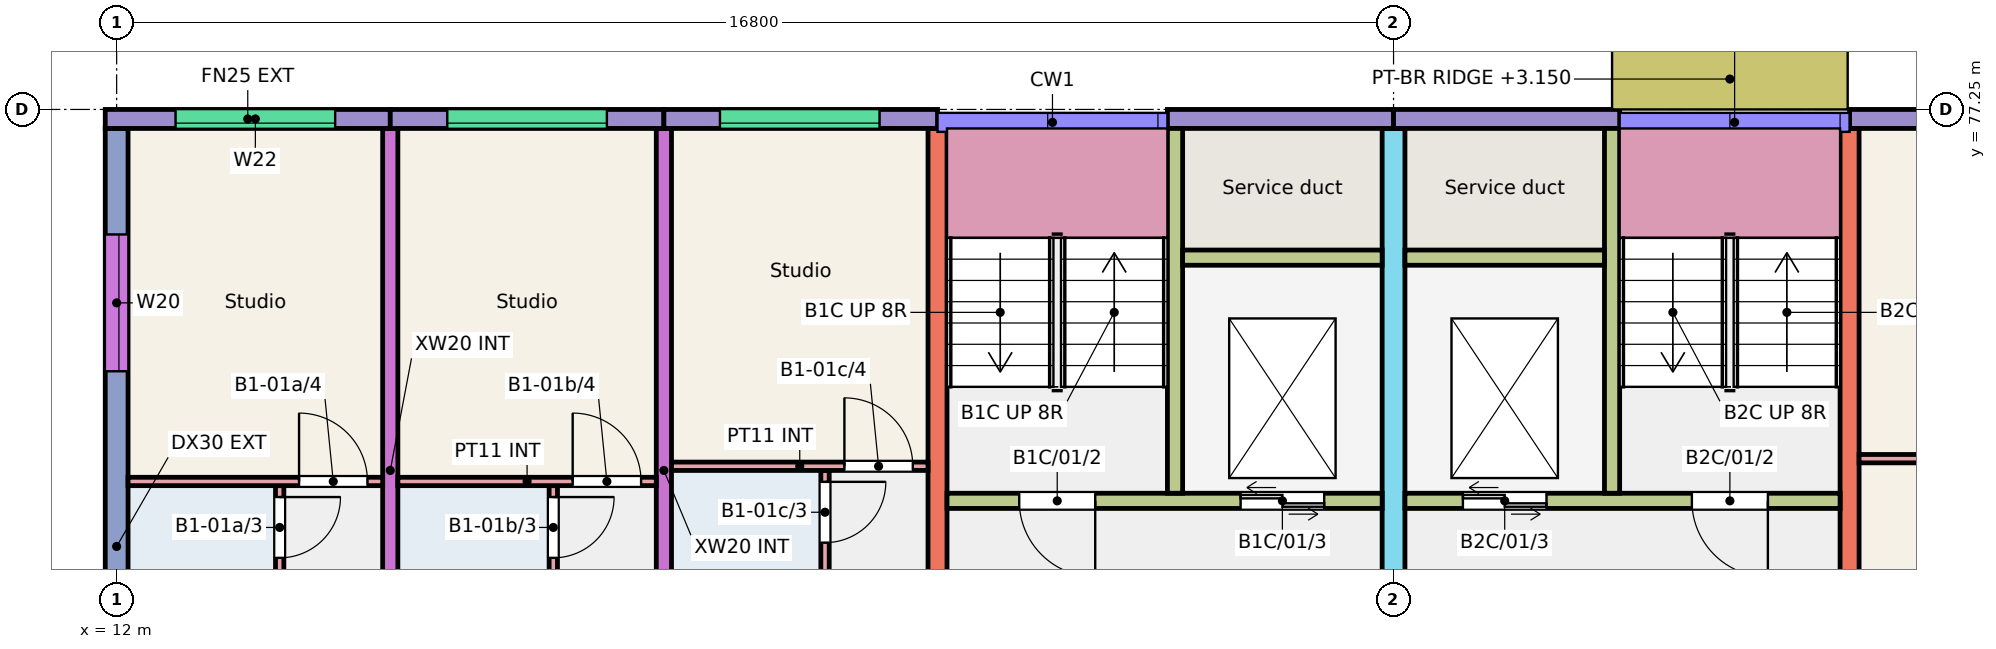
"""IFC4 building model, lengths in metres.
Left out: names, types, materials, properties, quantities, classifications, styles, units other than length and angle.
Written with IfcOpenShell. Run it as: python <this file> out.ifc"""

import sys

from ifc_helpers import new_model, si_unit, direction, frame, frame_2d, origin, place, context, subcontext, project, spatial, rectangle, extrude, element, fill, save


model = new_model("IFC4")
c1 = context("Model", 3, precision=1e-05, world=origin(), true_north=direction((0.0, 1.0)))
c2 = subcontext(c1, "Body", "Model", "MODEL_VIEW")
j1 = project(units=[si_unit("LENGTHUNIT", "METRE"), si_unit("PLANEANGLEUNIT", "RADIAN")], contexts=[c1])
p1 = place(None, origin())
s1 = spatial("IfcSite", under=j1, at=p1, CompositionType="ELEMENT")
p2 = place(p1, origin())
s2 = spatial("IfcBuilding", under=s1, at=p2, CompositionType="ELEMENT")
p3 = place(p2, frame((0.0, 0.0, 3.0)))
s3 = spatial("IfcBuildingStorey", under=s2, at=p3, CompositionType="ELEMENT", Elevation=3.0)
p4 = place(p3, frame((12.0, 66.0, 0.0), z_axis=(0.0, 0.0, 1.0), x_axis=(0.0, 1.0, 0.0)))
e1 = element("IfcWall", 1, at=p4, inside=s3, PredefinedType="SHEAR", context=c2, shape_type="SweptSolid", body=[
    extrude(rectangle(XDim=11.0, YDim=0.3, at=frame_2d((5.5, 0.0))), origin(), (0.0, 0.0, 1.0), 3.0),
])
p5 = place(p4, frame((2.6, 0.0, 0.9)))
e2 = element("IfcOpeningElement", 2, at=p5, cuts=e1, PredefinedType="OPENING", context=c2, shape_type="SweptSolid", body=[
    extrude(rectangle(XDim=1.2, YDim=1.5, at=frame_2d((0.6, 0.75))), frame((0.0, 0.16, 0.0), z_axis=(0.0, -1.0, 0.0), x_axis=(1.0, 0.0, 0.0)), (0.0, 0.0, 1.0), 0.32),
])
p6 = place(p4, frame((7.805, 0.0, 0.9)))
e3 = element("IfcOpeningElement", 3, at=p6, cuts=e1, PredefinedType="OPENING", context=c2, shape_type="SweptSolid", body=[
    extrude(rectangle(XDim=1.8, YDim=1.5, at=frame_2d((0.9, 0.75))), frame((0.0, 0.16, 0.0), z_axis=(0.0, -1.0, 0.0), x_axis=(1.0, 0.0, 0.0)), (0.0, 0.0, 1.0), 0.32),
])
for number, where, z_axis, x_axis in (
    (4, (15.6, 68.0, 0.0), (0.0, 0.0, 1.0), (0.0, 1.0, 0.0)),
    (5, (19.2, 68.0, 0.0), (0.0, 0.0, 1.0), (0.0, 1.0, 0.0)),
):
    element("IfcWall", number, at=place(p3, frame(where, z_axis=z_axis, x_axis=x_axis)), inside=s3, PredefinedType="SHEAR", context=c2, shape_type="SweptSolid", body=[
        extrude(rectangle(XDim=9.0, YDim=0.2, at=frame_2d((4.5, 0.0))), origin(), (0.0, 0.0, 1.0), 3.0),
    ])
p7 = place(p3, frame((22.8, 68.0, 0.0), z_axis=(0.0, 0.0, 1.0), x_axis=(0.0, 1.0, 0.0)))
e6 = element("IfcWall", 6, at=p7, inside=s3, PredefinedType="SHEAR", context=c2, shape_type="SweptSolid", body=[
    extrude(rectangle(XDim=9.0, YDim=0.25, at=frame_2d((4.5, 0.0))), origin(), (0.0, 0.0, 1.0), 3.0),
])
p8 = place(p3, frame((28.8, 66.0, 0.0), z_axis=(0.0, 0.0, 1.0), x_axis=(0.0, 1.0, 0.0)))
e7 = element("IfcWall", 7, at=p8, inside=s3, PredefinedType="SHEAR", context=c2, shape_type="SweptSolid", body=[
    extrude(rectangle(XDim=11.0, YDim=0.3, at=frame_2d((5.5, 0.0))), origin(), (0.0, 0.0, 1.0), 3.0),
])
p9 = place(p8, frame((0.3, 0.0, 0.0)))
e8 = element("IfcOpeningElement", 8, at=p9, cuts=e7, PredefinedType="OPENING", context=c2, shape_type="SweptSolid", body=[
    extrude(rectangle(XDim=1.2, YDim=2.1, at=frame_2d((0.6, 1.05))), frame((0.0, 0.16, 0.0), z_axis=(0.0, -1.0, 0.0), x_axis=(1.0, 0.0, 0.0)), (0.0, 0.0, 1.0), 0.32),
])
p10 = place(p3, frame((34.8, 68.0, 0.0), z_axis=(0.0, 0.0, 1.0), x_axis=(0.0, 1.0, 0.0)))
e9 = element("IfcWall", 9, at=p10, inside=s3, PredefinedType="SHEAR", context=c2, shape_type="SweptSolid", body=[
    extrude(rectangle(XDim=9.0, YDim=0.25, at=frame_2d((4.5, 0.0))), origin(), (0.0, 0.0, 1.0), 3.0),
])
p11 = place(p3, frame((11.85, 77.125, 0.0), z_axis=(0.0, 0.0, 1.0), x_axis=(1.0, 0.0, 0.0)))
e10 = element("IfcWall", 10, at=p11, inside=s3, PredefinedType="SOLIDWALL", context=c2, shape_type="SweptSolid", body=[
    extrude(rectangle(XDim=3.75, YDim=0.25, at=frame_2d((1.875, 0.0))), origin(), (0.0, 0.0, 1.0), 3.0),
])
p12 = place(p11, frame((0.925, 0.0, 1.2)))
e11 = element("IfcOpeningElement", 11, at=p12, cuts=e10, PredefinedType="OPENING", context=c2, shape_type="SweptSolid", body=[
    extrude(rectangle(XDim=2.1, YDim=1.2, at=frame_2d((1.05, 0.6))), frame((0.0, 0.135, 0.0), z_axis=(0.0, -1.0, 0.0), x_axis=(1.0, 0.0, 0.0)), (0.0, 0.0, 1.0), 0.27),
])
p13 = place(p3, frame((15.6, 77.125, 0.0), z_axis=(0.0, 0.0, 1.0), x_axis=(1.0, 0.0, 0.0)))
e12 = element("IfcWall", 12, at=p13, inside=s3, PredefinedType="SOLIDWALL", context=c2, shape_type="SweptSolid", body=[
    extrude(rectangle(XDim=3.6, YDim=0.25, at=frame_2d((1.8, 0.0))), origin(), (0.0, 0.0, 1.0), 3.0),
])
p14 = place(p13, frame((0.75, 0.0, 1.2)))
e13 = element("IfcOpeningElement", 13, at=p14, cuts=e12, PredefinedType="OPENING", context=c2, shape_type="SweptSolid", body=[
    extrude(rectangle(XDim=2.1, YDim=1.2, at=frame_2d((1.05, 0.6))), frame((0.0, 0.135, 0.0), z_axis=(0.0, -1.0, 0.0), x_axis=(1.0, 0.0, 0.0)), (0.0, 0.0, 1.0), 0.27),
])
p15 = place(p3, frame((19.2, 77.125, 0.0), z_axis=(0.0, 0.0, 1.0), x_axis=(1.0, 0.0, 0.0)))
e14 = element("IfcWall", 14, at=p15, inside=s3, PredefinedType="SOLIDWALL", context=c2, shape_type="SweptSolid", body=[
    extrude(rectangle(XDim=3.6, YDim=0.25, at=frame_2d((1.8, 0.0))), origin(), (0.0, 0.0, 1.0), 3.0),
])
p16 = place(p15, frame((0.738, 0.0, 1.2)))
e15 = element("IfcOpeningElement", 15, at=p16, cuts=e14, PredefinedType="OPENING", context=c2, shape_type="SweptSolid", body=[
    extrude(rectangle(XDim=2.1, YDim=1.2, at=frame_2d((1.05, 0.6))), frame((0.0, 0.135, 0.0), z_axis=(0.0, -1.0, 0.0), x_axis=(1.0, 0.0, 0.0)), (0.0, 0.0, 1.0), 0.27),
])
p17 = place(p3, frame((25.825, 77.125, 0.0), z_axis=(0.0, 0.0, 1.0), x_axis=(1.0, 0.0, 0.0)))
e16 = element("IfcWall", 16, at=p17, inside=s3, PredefinedType="SOLIDWALL", context=c2, shape_type="SweptSolid", body=[
    extrude(rectangle(XDim=2.975, YDim=0.25, at=frame_2d((1.488, 0.0))), origin(), (0.0, 0.0, 1.0), 3.0),
])
p18 = place(p3, frame((22.925, 72.1, 0.0), z_axis=(0.0, 0.0, 1.0), x_axis=(1.0, 0.0, 0.0)))
e17 = element("IfcWall", 17, at=p18, inside=s3, PredefinedType="SHEAR", context=c2, shape_type="SweptSolid", body=[
    extrude(rectangle(XDim=5.725, YDim=0.2, at=frame_2d((2.862, 0.0))), origin(), (0.0, 0.0, 1.0), 3.0),
])
p19 = place(p18, frame((0.95, 0.0, 0.0)))
e18 = element("IfcOpeningElement", 18, at=p19, cuts=e17, PredefinedType="OPENING", context=c2, shape_type="SweptSolid", body=[
    extrude(rectangle(XDim=1.0, YDim=2.1, at=frame_2d((0.5, 1.05))), frame((0.0, 0.11, 0.0), z_axis=(0.0, -1.0, 0.0), x_axis=(1.0, 0.0, 0.0)), (0.0, 0.0, 1.0), 0.22),
])
p20 = place(p18, frame((3.863, 0.0, 0.0)))
e19 = element("IfcOpeningElement", 19, at=p20, cuts=e17, PredefinedType="OPENING", context=c2, shape_type="SweptSolid", body=[
    extrude(rectangle(XDim=1.1, YDim=2.1, at=frame_2d((0.55, 1.05))), frame((0.0, 0.11, 0.0), z_axis=(0.0, -1.0, 0.0), x_axis=(1.0, 0.0, 0.0)), (0.0, 0.0, 1.0), 0.22),
])
p21 = place(p3, frame((25.925, 72.2, 0.0), z_axis=(0.0, 0.0, 1.0), x_axis=(0.0, 1.0, 0.0)))
e20 = element("IfcWall", 20, at=p21, inside=s3, PredefinedType="SHEAR", context=c2, shape_type="SweptSolid", body=[
    extrude(rectangle(XDim=4.8, YDim=0.2, at=frame_2d((2.4, 0.0))), origin(), (0.0, 0.0, 1.0), 3.0),
])
p22 = place(p3, frame((26.025, 75.3, 0.0), z_axis=(0.0, 0.0, 1.0), x_axis=(1.0, 0.0, 0.0)))
e21 = element("IfcWall", 21, at=p22, inside=s3, PredefinedType="SHEAR", context=c2, shape_type="SweptSolid", body=[
    extrude(rectangle(XDim=2.625, YDim=0.2, at=frame_2d((1.312, 0.0))), origin(), (0.0, 0.0, 1.0), 3.0),
])
p23 = place(p3, frame((28.8, 77.125, 0.0), z_axis=(0.0, 0.0, 1.0), x_axis=(1.0, 0.0, 0.0)))
e22 = element("IfcWall", 22, at=p23, inside=s3, PredefinedType="SOLIDWALL", context=c2, shape_type="SweptSolid", body=[
    extrude(rectangle(XDim=2.975, YDim=0.25, at=frame_2d((1.487, 0.0))), origin(), (0.0, 0.0, 1.0), 3.0),
])
p24 = place(p3, frame((28.95, 72.1, 0.0), z_axis=(0.0, 0.0, 1.0), x_axis=(1.0, 0.0, 0.0)))
e23 = element("IfcWall", 23, at=p24, inside=s3, PredefinedType="SHEAR", context=c2, shape_type="SweptSolid", body=[
    extrude(rectangle(XDim=5.725, YDim=0.2, at=frame_2d((2.863, 0.0))), origin(), (0.0, 0.0, 1.0), 3.0),
])
p25 = place(p24, frame((3.775, 0.0, 0.0)))
e24 = element("IfcOpeningElement", 24, at=p25, cuts=e23, PredefinedType="OPENING", context=c2, shape_type="SweptSolid", body=[
    extrude(rectangle(XDim=1.0, YDim=2.1, at=frame_2d((0.5, 1.05))), frame((0.0, 0.11, 0.0), z_axis=(0.0, -1.0, 0.0), x_axis=(1.0, 0.0, 0.0)), (0.0, 0.0, 1.0), 0.22),
])
p26 = place(p24, frame((0.762, 0.0, 0.0)))
e25 = element("IfcOpeningElement", 25, at=p26, cuts=e23, PredefinedType="OPENING", context=c2, shape_type="SweptSolid", body=[
    extrude(rectangle(XDim=1.1, YDim=2.1, at=frame_2d((0.55, 1.05))), frame((0.0, 0.11, 0.0), z_axis=(0.0, -1.0, 0.0), x_axis=(1.0, 0.0, 0.0)), (0.0, 0.0, 1.0), 0.22),
])
p27 = place(p3, frame((31.675, 72.2, 0.0), z_axis=(0.0, 0.0, 1.0), x_axis=(0.0, 1.0, 0.0)))
e26 = element("IfcWall", 26, at=p27, inside=s3, PredefinedType="SHEAR", context=c2, shape_type="SweptSolid", body=[
    extrude(rectangle(XDim=4.8, YDim=0.2, at=frame_2d((2.4, 0.0))), origin(), (0.0, 0.0, 1.0), 3.0),
])
p28 = place(p3, frame((28.95, 75.3, 0.0), z_axis=(0.0, 0.0, 1.0), x_axis=(1.0, 0.0, 0.0)))
e27 = element("IfcWall", 27, at=p28, inside=s3, PredefinedType="SHEAR", context=c2, shape_type="SweptSolid", body=[
    extrude(rectangle(XDim=2.625, YDim=0.2, at=frame_2d((1.312, 0.0))), origin(), (0.0, 0.0, 1.0), 3.0),
])
p29 = place(p3, frame((34.8, 77.125, 0.0), z_axis=(0.0, 0.0, 1.0), x_axis=(1.0, 0.0, 0.0)))
e28 = element("IfcWall", 28, at=p29, inside=s3, PredefinedType="SOLIDWALL", context=c2, shape_type="SweptSolid", body=[
    extrude(rectangle(XDim=3.6, YDim=0.25, at=frame_2d((1.8, 0.0))), origin(), (0.0, 0.0, 1.0), 3.0),
])
p30 = place(p29, frame((1.2, 0.0, 1.1)))
e29 = element("IfcOpeningElement", 29, at=p30, cuts=e28, PredefinedType="OPENING", context=c2, shape_type="SweptSolid", body=[
    extrude(rectangle(XDim=1.2, YDim=1.3, at=frame_2d((0.6, 0.65))), frame((0.0, 0.135, 0.0), z_axis=(0.0, -1.0, 0.0), x_axis=(1.0, 0.0, 0.0)), (0.0, 0.0, 1.0), 0.27),
])
p31 = place(p3, frame((14.145, 68.0, 0.0), z_axis=(0.0, 0.0, 1.0), x_axis=(0.0, 1.0, 0.0)))
e30 = element("IfcWall", 30, at=p31, inside=s3, PredefinedType="PARTITIONING", context=c2, shape_type="SweptSolid", body=[
    extrude(rectangle(XDim=4.3, YDim=0.11, at=frame_2d((2.15, 0.0))), origin(), (0.0, 0.0, 1.0), 2.8),
])
p32 = place(p31, frame((0.2, 0.0, 0.0)))
e31 = element("IfcOpeningElement", 31, at=p32, cuts=e30, PredefinedType="OPENING", context=c2, shape_type="SweptSolid", body=[
    extrude(rectangle(XDim=0.8, YDim=2.1, at=frame_2d((0.4, 1.05))), frame((0.0, 0.065, 0.0), z_axis=(0.0, -1.0, 0.0), x_axis=(1.0, 0.0, 0.0)), (0.0, 0.0, 1.0), 0.13),
])
p33 = place(p31, frame((3.35, 0.0, 0.0)))
e32 = element("IfcOpeningElement", 32, at=p33, cuts=e30, PredefinedType="OPENING", context=c2, shape_type="SweptSolid", body=[
    extrude(rectangle(XDim=0.8, YDim=2.1, at=frame_2d((0.4, 1.05))), frame((0.0, 0.065, 0.0), z_axis=(0.0, -1.0, 0.0), x_axis=(1.0, 0.0, 0.0)), (0.0, 0.0, 1.0), 0.13),
])
p34 = place(p3, frame((12.15, 72.355, 0.0), z_axis=(0.0, 0.0, 1.0), x_axis=(1.0, 0.0, 0.0)))
e33 = element("IfcWall", 33, at=p34, inside=s3, PredefinedType="PARTITIONING", context=c2, shape_type="SweptSolid", body=[
    extrude(rectangle(XDim=3.35, YDim=0.11, at=frame_2d((1.675, 0.0))), origin(), (0.0, 0.0, 1.0), 2.8),
])
p35 = place(p34, frame((2.25, 0.0, 0.0)))
e34 = element("IfcOpeningElement", 34, at=p35, cuts=e33, PredefinedType="OPENING", context=c2, shape_type="SweptSolid", body=[
    extrude(rectangle(XDim=0.9, YDim=2.1, at=frame_2d((0.45, 1.05))), frame((0.0, 0.065, 0.0), z_axis=(0.0, -1.0, 0.0), x_axis=(1.0, 0.0, 0.0)), (0.0, 0.0, 1.0), 0.13),
])
p36 = place(p3, frame((17.745, 68.0, 0.0), z_axis=(0.0, 0.0, 1.0), x_axis=(0.0, 1.0, 0.0)))
e35 = element("IfcWall", 35, at=p36, inside=s3, PredefinedType="PARTITIONING", context=c2, shape_type="SweptSolid", body=[
    extrude(rectangle(XDim=4.3, YDim=0.11, at=frame_2d((2.15, 0.0))), origin(), (0.0, 0.0, 1.0), 2.8),
])
p37 = place(p36, frame((0.2, 0.0, 0.0)))
e36 = element("IfcOpeningElement", 36, at=p37, cuts=e35, PredefinedType="OPENING", context=c2, shape_type="SweptSolid", body=[
    extrude(rectangle(XDim=0.8, YDim=2.1, at=frame_2d((0.4, 1.05))), frame((0.0, 0.065, 0.0), z_axis=(0.0, -1.0, 0.0), x_axis=(1.0, 0.0, 0.0)), (0.0, 0.0, 1.0), 0.13),
])
p38 = place(p36, frame((3.35, 0.0, 0.0)))
e37 = element("IfcOpeningElement", 37, at=p38, cuts=e35, PredefinedType="OPENING", context=c2, shape_type="SweptSolid", body=[
    extrude(rectangle(XDim=0.8, YDim=2.1, at=frame_2d((0.4, 1.05))), frame((0.0, 0.065, 0.0), z_axis=(0.0, -1.0, 0.0), x_axis=(1.0, 0.0, 0.0)), (0.0, 0.0, 1.0), 0.13),
])
p39 = place(p3, frame((15.7, 72.355, 0.0), z_axis=(0.0, 0.0, 1.0), x_axis=(1.0, 0.0, 0.0)))
e38 = element("IfcWall", 38, at=p39, inside=s3, PredefinedType="PARTITIONING", context=c2, shape_type="SweptSolid", body=[
    extrude(rectangle(XDim=3.4, YDim=0.11, at=frame_2d((1.7, 0.0))), origin(), (0.0, 0.0, 1.0), 2.8),
])
p40 = place(p39, frame((2.3, 0.0, 0.0)))
e39 = element("IfcOpeningElement", 39, at=p40, cuts=e38, PredefinedType="OPENING", context=c2, shape_type="SweptSolid", body=[
    extrude(rectangle(XDim=0.9, YDim=2.1, at=frame_2d((0.45, 1.05))), frame((0.0, 0.065, 0.0), z_axis=(0.0, -1.0, 0.0), x_axis=(1.0, 0.0, 0.0)), (0.0, 0.0, 1.0), 0.13),
])
p41 = place(p3, frame((21.32, 68.0, 0.0), z_axis=(0.0, 0.0, 1.0), x_axis=(0.0, 1.0, 0.0)))
e40 = element("IfcWall", 40, at=p41, inside=s3, PredefinedType="PARTITIONING", context=c2, shape_type="SweptSolid", body=[
    extrude(rectangle(XDim=4.5, YDim=0.11, at=frame_2d((2.25, 0.0))), origin(), (0.0, 0.0, 1.0), 2.8),
])
p42 = place(p41, frame((0.2, 0.0, 0.0)))
e41 = element("IfcOpeningElement", 41, at=p42, cuts=e40, PredefinedType="OPENING", context=c2, shape_type="SweptSolid", body=[
    extrude(rectangle(XDim=0.8, YDim=2.1, at=frame_2d((0.4, 1.05))), frame((0.0, 0.065, 0.0), z_axis=(0.0, -1.0, 0.0), x_axis=(1.0, 0.0, 0.0)), (0.0, 0.0, 1.0), 0.13),
])
p43 = place(p41, frame((3.55, 0.0, 0.0)))
e42 = element("IfcOpeningElement", 42, at=p43, cuts=e40, PredefinedType="OPENING", context=c2, shape_type="SweptSolid", body=[
    extrude(rectangle(XDim=0.8, YDim=2.1, at=frame_2d((0.4, 1.05))), frame((0.0, 0.065, 0.0), z_axis=(0.0, -1.0, 0.0), x_axis=(1.0, 0.0, 0.0)), (0.0, 0.0, 1.0), 0.13),
])
p44 = place(p3, frame((19.3, 72.555, 0.0), z_axis=(0.0, 0.0, 1.0), x_axis=(1.0, 0.0, 0.0)))
e43 = element("IfcWall", 43, at=p44, inside=s3, PredefinedType="PARTITIONING", context=c2, shape_type="SweptSolid", body=[
    extrude(rectangle(XDim=3.375, YDim=0.11, at=frame_2d((1.688, 0.0))), origin(), (0.0, 0.0, 1.0), 2.8),
])
p45 = place(p44, frame((2.275, 0.0, 0.0)))
e44 = element("IfcOpeningElement", 44, at=p45, cuts=e43, PredefinedType="OPENING", context=c2, shape_type="SweptSolid", body=[
    extrude(rectangle(XDim=0.9, YDim=2.1, at=frame_2d((0.45, 1.05))), frame((0.0, 0.065, 0.0), z_axis=(0.0, -1.0, 0.0), x_axis=(1.0, 0.0, 0.0)), (0.0, 0.0, 1.0), 0.13),
])
p46 = place(p3, frame((34.925, 72.655, 0.0), z_axis=(0.0, 0.0, 1.0), x_axis=(1.0, 0.0, 0.0)))
e45 = element("IfcWall", 45, at=p46, inside=s3, PredefinedType="PARTITIONING", context=c2, shape_type="SweptSolid", body=[
    extrude(rectangle(XDim=3.35, YDim=0.11, at=frame_2d((1.675, 0.0))), origin(), (0.0, 0.0, 1.0), 2.8),
])
p47 = place(p12, origin())
e46 = element("IfcWindow", 46, at=p47, inside=s3, PartitioningType="SINGLE_PANEL", PredefinedType="WINDOW", context=c2, shape_type="SweptSolid", body=[
    extrude(rectangle(XDim=2.1, YDim=1.2, at=frame_2d((1.05, 0.6))), frame((0.0, -0.025, 0.0), z_axis=(0.0, -1.0, 0.0), x_axis=(1.0, 0.0, 0.0)), (0.0, 0.0, 1.0), 0.06),
])
fill(e11, e46)
p48 = place(p6, origin())
e47 = element("IfcWindow", 47, at=p48, inside=s3, PartitioningType="SINGLE_PANEL", PredefinedType="WINDOW", context=c2, shape_type="SweptSolid", body=[
    extrude(rectangle(XDim=1.8, YDim=1.5, at=frame_2d((0.9, 0.75))), frame((0.0, 0.0, 0.0), z_axis=(0.0, -1.0, 0.0), x_axis=(1.0, 0.0, 0.0)), (0.0, 0.0, 1.0), 0.06),
])
fill(e3, e47)
p49 = place(p14, origin())
e48 = element("IfcWindow", 48, at=p49, inside=s3, PartitioningType="SINGLE_PANEL", PredefinedType="WINDOW", context=c2, shape_type="SweptSolid", body=[
    extrude(rectangle(XDim=2.1, YDim=1.2, at=frame_2d((1.05, 0.6))), frame((0.0, -0.025, 0.0), z_axis=(0.0, -1.0, 0.0), x_axis=(1.0, 0.0, 0.0)), (0.0, 0.0, 1.0), 0.06),
])
fill(e13, e48)
p50 = place(p16, origin())
e49 = element("IfcWindow", 49, at=p50, inside=s3, PartitioningType="SINGLE_PANEL", PredefinedType="WINDOW", context=c2, shape_type="SweptSolid", body=[
    extrude(rectangle(XDim=2.1, YDim=1.2, at=frame_2d((1.05, 0.6))), frame((0.0, -0.025, 0.0), z_axis=(0.0, -1.0, 0.0), x_axis=(1.0, 0.0, 0.0)), (0.0, 0.0, 1.0), 0.06),
])
fill(e15, e49)
p51 = place(p33, origin())
e50 = element("IfcDoor", 50, at=p51, inside=s3, OperationType="SINGLE_SWING_RIGHT", PredefinedType="DOOR", context=c2, shape_type="SweptSolid", body=[
    extrude(rectangle(XDim=0.8, YDim=2.1, at=frame_2d((0.4, 1.05))), frame((0.0, 0.025, 0.0), z_axis=(0.0, -1.0, 0.0), x_axis=(1.0, 0.0, 0.0)), (0.0, 0.0, 1.0), 0.05),
])
fill(e32, e50)
p52 = place(p35, origin())
e51 = element("IfcDoor", 51, at=p52, inside=s3, OperationType="SINGLE_SWING_LEFT", PredefinedType="DOOR", context=c2, shape_type="SweptSolid", body=[
    extrude(rectangle(XDim=0.9, YDim=2.1, at=frame_2d((0.45, 1.05))), frame((0.0, 0.025, 0.0), z_axis=(0.0, -1.0, 0.0), x_axis=(1.0, 0.0, 0.0)), (0.0, 0.0, 1.0), 0.05),
])
fill(e34, e51)
p53 = place(p38, origin())
e52 = element("IfcDoor", 52, at=p53, inside=s3, OperationType="SINGLE_SWING_RIGHT", PredefinedType="DOOR", context=c2, shape_type="SweptSolid", body=[
    extrude(rectangle(XDim=0.8, YDim=2.1, at=frame_2d((0.4, 1.05))), frame((0.0, 0.025, 0.0), z_axis=(0.0, -1.0, 0.0), x_axis=(1.0, 0.0, 0.0)), (0.0, 0.0, 1.0), 0.05),
])
fill(e37, e52)
p54 = place(p40, origin())
e53 = element("IfcDoor", 53, at=p54, inside=s3, OperationType="SINGLE_SWING_LEFT", PredefinedType="DOOR", context=c2, shape_type="SweptSolid", body=[
    extrude(rectangle(XDim=0.9, YDim=2.1, at=frame_2d((0.45, 1.05))), frame((0.0, 0.025, 0.0), z_axis=(0.0, -1.0, 0.0), x_axis=(1.0, 0.0, 0.0)), (0.0, 0.0, 1.0), 0.05),
])
fill(e39, e53)
p55 = place(p43, origin())
e54 = element("IfcDoor", 54, at=p55, inside=s3, OperationType="SINGLE_SWING_RIGHT", PredefinedType="DOOR", context=c2, shape_type="SweptSolid", body=[
    extrude(rectangle(XDim=0.8, YDim=2.1, at=frame_2d((0.4, 1.05))), frame((0.0, 0.025, 0.0), z_axis=(0.0, -1.0, 0.0), x_axis=(1.0, 0.0, 0.0)), (0.0, 0.0, 1.0), 0.05),
])
fill(e42, e54)
p56 = place(p45, origin())
e55 = element("IfcDoor", 55, at=p56, inside=s3, OperationType="SINGLE_SWING_LEFT", PredefinedType="DOOR", context=c2, shape_type="SweptSolid", body=[
    extrude(rectangle(XDim=0.9, YDim=2.1, at=frame_2d((0.45, 1.05))), frame((0.0, 0.025, 0.0), z_axis=(0.0, -1.0, 0.0), x_axis=(1.0, 0.0, 0.0)), (0.0, 0.0, 1.0), 0.05),
])
fill(e44, e55)
p57 = place(p19, origin())
e56 = element("IfcDoor", 56, at=p57, inside=s3, OperationType="SINGLE_SWING_RIGHT", PredefinedType="DOOR", context=c2, shape_type="SweptSolid", body=[
    extrude(rectangle(XDim=1.0, YDim=2.1, at=frame_2d((0.5, 1.05))), frame((0.0, 0.025, 0.0), z_axis=(0.0, -1.0, 0.0), x_axis=(1.0, 0.0, 0.0)), (0.0, 0.0, 1.0), 0.05),
])
fill(e18, e56)
p58 = place(p20, origin())
e57 = element("IfcDoor", 57, at=p58, inside=s3, OperationType="DOUBLE_DOOR_SLIDING", PredefinedType="DOOR", context=c2, shape_type="SweptSolid", body=[
    extrude(rectangle(XDim=1.1, YDim=2.1, at=frame_2d((0.55, 1.05))), frame((0.0, 0.025, 0.0), z_axis=(0.0, -1.0, 0.0), x_axis=(1.0, 0.0, 0.0)), (0.0, 0.0, 1.0), 0.05),
])
fill(e19, e57)
p59 = place(p25, origin())
e58 = element("IfcDoor", 58, at=p59, inside=s3, OperationType="SINGLE_SWING_RIGHT", PredefinedType="DOOR", context=c2, shape_type="SweptSolid", body=[
    extrude(rectangle(XDim=1.0, YDim=2.1, at=frame_2d((0.5, 1.05))), frame((0.0, 0.025, 0.0), z_axis=(0.0, -1.0, 0.0), x_axis=(1.0, 0.0, 0.0)), (0.0, 0.0, 1.0), 0.05),
])
fill(e24, e58)
p60 = place(p26, origin())
e59 = element("IfcDoor", 59, at=p60, inside=s3, OperationType="DOUBLE_DOOR_SLIDING", PredefinedType="DOOR", context=c2, shape_type="SweptSolid", body=[
    extrude(rectangle(XDim=1.1, YDim=2.1, at=frame_2d((0.55, 1.05))), frame((0.0, 0.025, 0.0), z_axis=(0.0, -1.0, 0.0), x_axis=(1.0, 0.0, 0.0)), (0.0, 0.0, 1.0), 0.05),
])
fill(e25, e59)
save(model, sys.argv[1])
